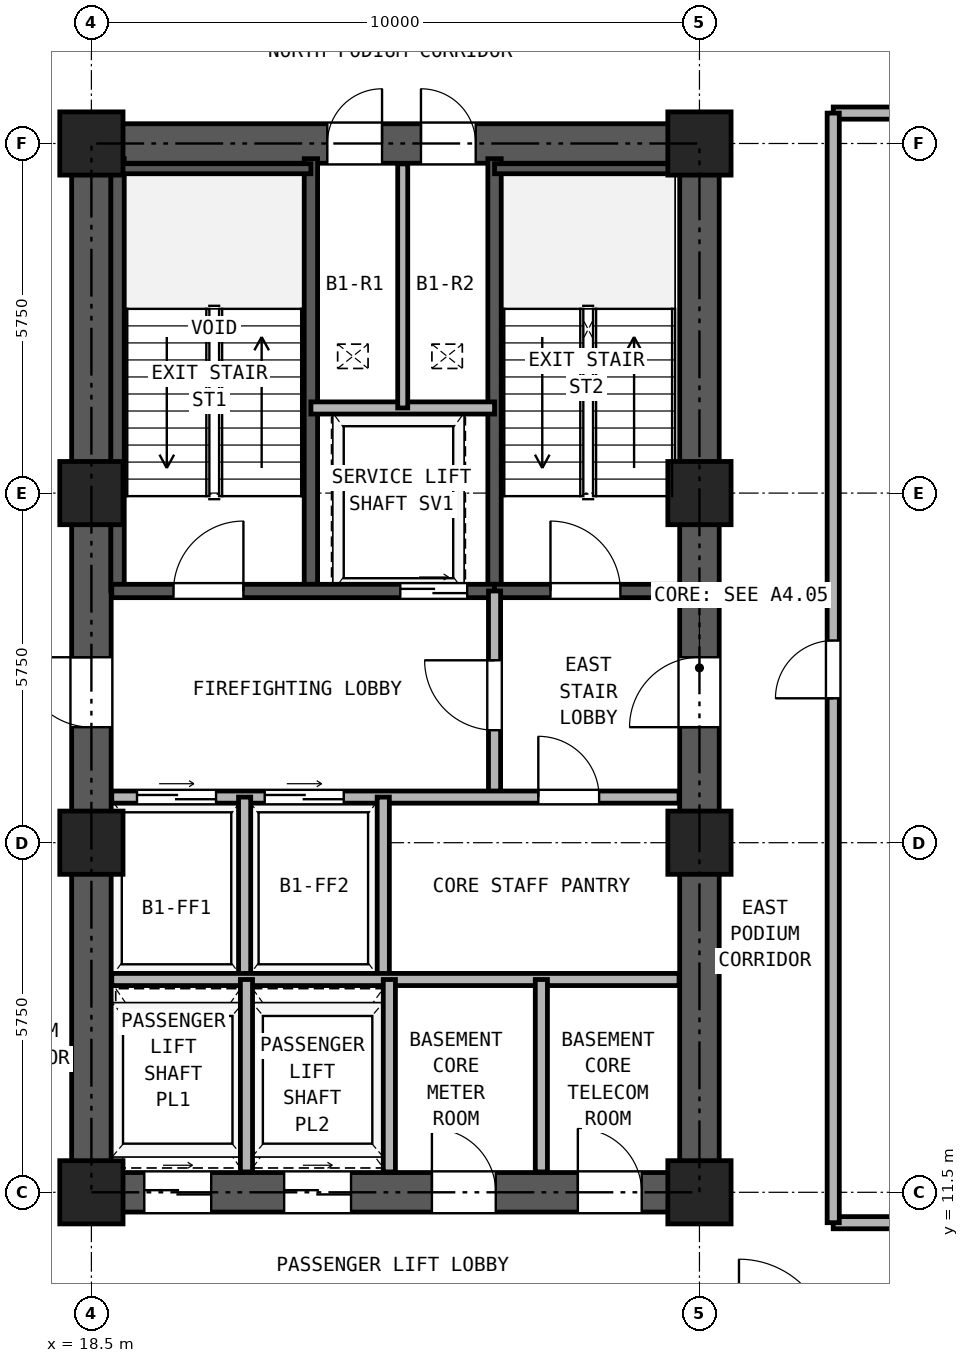
"""IFC4 building model, lengths in metres.
Left out: names, types, materials, properties, quantities, classifications, styles, units other than length and angle.
Written with IfcOpenShell. Run it as: python <this file> out.ifc"""

import sys

from ifc_helpers import new_model, si_unit, direction, frame, frame_2d, origin, origin_2d, place, context, subcontext, project, spatial, rectangle, hollow_rectangle, extrude, source, transform, mapped, element, fill, save


model = new_model("IFC4")
c1 = context("Model", 3, precision=1e-05, world=origin(), true_north=direction((0.0, 1.0)))
c2 = subcontext(c1, "Body", "Model", "MODEL_VIEW")
j1 = project(units=[si_unit("LENGTHUNIT", "METRE"), si_unit("PLANEANGLEUNIT", "RADIAN")], contexts=[c1])
p1 = place(None, origin())
s1 = spatial("IfcSite", under=j1, at=p1, CompositionType="ELEMENT")
p2 = place(p1, origin())
s2 = spatial("IfcBuilding", under=s1, at=p2, CompositionType="ELEMENT")
p3 = place(p2, frame((0.0, 0.0, -4.2)))
s3 = spatial("IfcBuildingStorey", under=s2, at=p3, CompositionType="ELEMENT", Elevation=-4.2)
m1 = source(origin(), c2, "Body", "SweptSolid", [
    extrude(hollow_rectangle(XDim=1.04, YDim=1.04, WallThickness=0.065, at=origin_2d()), origin(), (0.0, 0.0, 1.0), 3.88),
])
for number, where, z_axis, x_axis in (
    (1, (18.5, 11.5, 0.0), (0.0, 0.0, 1.0), (1.0, 0.0, 0.0)),
    (2, (18.5, 17.25, 0.0), (0.0, 0.0, 1.0), (1.0, 0.0, 0.0)),
    (3, (18.5, 23.0, 0.0), (0.0, 0.0, 1.0), (1.0, 0.0, 0.0)),
    (4, (18.5, 28.75, 0.0), (0.0, 0.0, 1.0), (1.0, 0.0, 0.0)),
    (5, (28.5, 11.5, 0.0), (0.0, 0.0, 1.0), (1.0, 0.0, 0.0)),
    (6, (28.5, 17.25, 0.0), (0.0, 0.0, 1.0), (1.0, 0.0, 0.0)),
    (7, (28.5, 23.0, 0.0), (0.0, 0.0, 1.0), (1.0, 0.0, 0.0)),
    (8, (28.5, 28.75, 0.0), (0.0, 0.0, 1.0), (1.0, 0.0, 0.0)),
):
    element("IfcColumn", number, at=place(p3, frame(where, z_axis=z_axis, x_axis=x_axis)), inside=s3, PredefinedType="COLUMN", context=c2, shape_type="MappedRepresentation", body=[
        mapped(m1, transform((0.0, 0.0, 0.0), x_axis=(1.0, 0.0, 0.0), y_axis=(0.0, 1.0, 0.0), z_axis=(0.0, 0.0, 1.0), scale=1.0)),
    ])
p4 = place(p3, frame((18.175, 11.5, 0.0), z_axis=(0.0, 0.0, 1.0), x_axis=(1.0, 0.0, 0.0)))
e9 = element("IfcWall", 9, at=p4, inside=s3, PredefinedType="SHEAR", context=c2, shape_type="SweptSolid", body=[
    extrude(rectangle(XDim=10.65, YDim=0.65, at=frame_2d((5.325, 0.0))), origin(), (0.0, 0.0, 1.0), 3.88),
])
p5 = place(p4, frame((1.195, 0.0, 0.0)))
e10 = element("IfcOpeningElement", 10, at=p5, cuts=e9, PredefinedType="OPENING", context=c2, shape_type="SweptSolid", body=[
    extrude(rectangle(XDim=1.1, YDim=2.25, at=frame_2d((0.55, 1.125))), frame((0.0, 0.335, 0.0), z_axis=(0.0, -1.0, 0.0), x_axis=(1.0, 0.0, 0.0)), (0.0, 0.0, 1.0), 0.67),
])
p6 = place(p4, frame((3.495, 0.0, 0.0)))
e11 = element("IfcOpeningElement", 11, at=p6, cuts=e9, PredefinedType="OPENING", context=c2, shape_type="SweptSolid", body=[
    extrude(rectangle(XDim=1.1, YDim=2.25, at=frame_2d((0.55, 1.125))), frame((0.0, 0.335, 0.0), z_axis=(0.0, -1.0, 0.0), x_axis=(1.0, 0.0, 0.0)), (0.0, 0.0, 1.0), 0.67),
])
p7 = place(p4, frame((5.925, 0.0, 0.0)))
e12 = element("IfcOpeningElement", 12, at=p7, cuts=e9, PredefinedType="OPENING", context=c2, shape_type="SweptSolid", body=[
    extrude(rectangle(XDim=1.05, YDim=2.15, at=frame_2d((0.525, 1.075))), frame((0.0, 0.335, 0.0), z_axis=(0.0, -1.0, 0.0), x_axis=(1.0, 0.0, 0.0)), (0.0, 0.0, 1.0), 0.67),
])
p8 = place(p4, frame((8.325, 0.0, 0.0)))
e13 = element("IfcOpeningElement", 13, at=p8, cuts=e9, PredefinedType="OPENING", context=c2, shape_type="SweptSolid", body=[
    extrude(rectangle(XDim=1.05, YDim=2.15, at=frame_2d((0.525, 1.075))), frame((0.0, 0.335, 0.0), z_axis=(0.0, -1.0, 0.0), x_axis=(1.0, 0.0, 0.0)), (0.0, 0.0, 1.0), 0.67),
])
p9 = place(p3, frame((18.175, 28.75, 0.0), z_axis=(0.0, 0.0, 1.0), x_axis=(1.0, 0.0, 0.0)))
e14 = element("IfcWall", 14, at=p9, inside=s3, PredefinedType="SHEAR", context=c2, shape_type="SweptSolid", body=[
    extrude(rectangle(XDim=10.65, YDim=0.65, at=frame_2d((5.325, 0.0))), origin(), (0.0, 0.0, 1.0), 3.88),
])
p10 = place(p9, frame((4.205, 0.0, 0.0)))
e15 = element("IfcOpeningElement", 15, at=p10, cuts=e14, PredefinedType="OPENING", context=c2, shape_type="SweptSolid", body=[
    extrude(rectangle(XDim=0.9, YDim=2.05, at=frame_2d((0.45, 1.025))), frame((0.0, 0.335, 0.0), z_axis=(0.0, -1.0, 0.0), x_axis=(1.0, 0.0, 0.0)), (0.0, 0.0, 1.0), 0.67),
])
p11 = place(p9, frame((5.745, 0.0, 0.0)))
e16 = element("IfcOpeningElement", 16, at=p11, cuts=e14, PredefinedType="OPENING", context=c2, shape_type="SweptSolid", body=[
    extrude(rectangle(XDim=0.9, YDim=2.05, at=frame_2d((0.45, 1.025))), frame((0.0, 0.335, 0.0), z_axis=(0.0, -1.0, 0.0), x_axis=(1.0, 0.0, 0.0)), (0.0, 0.0, 1.0), 0.67),
])
p12 = place(p3, frame((18.5, 11.825, 0.0), z_axis=(0.0, 0.0, 1.0), x_axis=(0.0, 1.0, 0.0)))
e17 = element("IfcWall", 17, at=p12, inside=s3, PredefinedType="SHEAR", context=c2, shape_type="SweptSolid", body=[
    extrude(rectangle(XDim=16.6, YDim=0.65, at=frame_2d((8.3, 0.0))), origin(), (0.0, 0.0, 1.0), 3.88),
])
p13 = place(p12, frame((7.325, 0.0, 0.0)))
e18 = element("IfcOpeningElement", 18, at=p13, cuts=e17, PredefinedType="OPENING", context=c2, shape_type="SweptSolid", body=[
    extrude(rectangle(XDim=1.15, YDim=2.2, at=frame_2d((0.575, 1.1))), frame((0.0, 0.335, 0.0), z_axis=(0.0, -1.0, 0.0), x_axis=(1.0, 0.0, 0.0)), (0.0, 0.0, 1.0), 0.67),
])
p14 = place(p3, frame((28.5, 11.825, 0.0), z_axis=(0.0, 0.0, 1.0), x_axis=(0.0, 1.0, 0.0)))
e19 = element("IfcWall", 19, at=p14, inside=s3, PredefinedType="SHEAR", context=c2, shape_type="SweptSolid", body=[
    extrude(rectangle(XDim=16.6, YDim=0.65, at=frame_2d((8.3, 0.0))), origin(), (0.0, 0.0, 1.0), 3.88),
])
p15 = place(p14, frame((7.325, 0.0, 0.0)))
e20 = element("IfcOpeningElement", 20, at=p15, cuts=e19, PredefinedType="OPENING", context=c2, shape_type="SweptSolid", body=[
    extrude(rectangle(XDim=1.15, YDim=2.2, at=frame_2d((0.575, 1.1))), frame((0.0, 0.335, 0.0), z_axis=(0.0, -1.0, 0.0), x_axis=(1.0, 0.0, 0.0)), (0.0, 0.0, 1.0), 0.67),
])
for number, where, z_axis, x_axis in (
    (21, (18.93, 21.39, 0.0), (0.0, 0.0, 1.0), (0.0, 1.0, 0.0)),
    (22, (22.11, 21.39, 0.0), (0.0, 0.0, 1.0), (0.0, 1.0, 0.0)),
    (23, (25.13, 21.39, 0.0), (0.0, 0.0, 1.0), (0.0, 1.0, 0.0)),
):
    element("IfcWall", number, at=place(p3, frame(where, z_axis=z_axis, x_axis=x_axis)), inside=s3, PredefinedType="SOLIDWALL", context=c2, shape_type="SweptSolid", body=[
        extrude(rectangle(XDim=7.11, YDim=0.22, at=frame_2d((3.555, 0.0))), origin(), (0.0, 0.0, 1.0), 3.88),
    ])
p16 = place(p3, frame((18.835, 28.335, 0.0), z_axis=(0.0, 0.0, 1.0), x_axis=(1.0, 0.0, 0.0)))
e24 = element("IfcWall", 24, at=p16, inside=s3, PredefinedType="PARTITIONING", context=c2, shape_type="SweptSolid", body=[
    extrude(rectangle(XDim=3.275, YDim=0.165, at=frame_2d((1.638, 0.0))), origin(), (0.0, 0.0, 1.0), 3.88),
])
p17 = place(p3, frame((25.13, 28.335, 0.0), z_axis=(0.0, 0.0, 1.0), x_axis=(1.0, 0.0, 0.0)))
e25 = element("IfcWall", 25, at=p17, inside=s3, PredefinedType="PARTITIONING", context=c2, shape_type="SweptSolid", body=[
    extrude(rectangle(XDim=3.035, YDim=0.165, at=frame_2d((1.518, 0.0))), origin(), (0.0, 0.0, 1.0), 3.88),
])
p18 = place(p3, frame((18.835, 21.39, 0.0), z_axis=(0.0, 0.0, 1.0), x_axis=(1.0, 0.0, 0.0)))
e26 = element("IfcWall", 26, at=p18, inside=s3, PredefinedType="SOLIDWALL", context=c2, shape_type="SweptSolid", body=[
    extrude(rectangle(XDim=6.295, YDim=0.22, at=frame_2d((3.147, 0.0))), origin(), (0.0, 0.0, 1.0), 3.88),
])
p19 = place(p18, frame((1.015, 0.0, 0.0)))
e27 = element("IfcOpeningElement", 27, at=p19, cuts=e26, PredefinedType="OPENING", context=c2, shape_type="SweptSolid", body=[
    extrude(rectangle(XDim=1.15, YDim=2.2, at=frame_2d((0.575, 1.1))), frame((0.0, 0.12, 0.0), z_axis=(0.0, -1.0, 0.0), x_axis=(1.0, 0.0, 0.0)), (0.0, 0.0, 1.0), 0.24),
])
p20 = place(p18, frame((4.745, 0.0, 0.0)))
e28 = element("IfcOpeningElement", 28, at=p20, cuts=e26, PredefinedType="OPENING", context=c2, shape_type="SweptSolid", body=[
    extrude(rectangle(XDim=1.1, YDim=2.25, at=frame_2d((0.55, 1.125))), frame((0.0, 0.12, 0.0), z_axis=(0.0, -1.0, 0.0), x_axis=(1.0, 0.0, 0.0)), (0.0, 0.0, 1.0), 0.24),
])
p21 = place(p3, frame((25.13, 21.39, 0.0), z_axis=(0.0, 0.0, 1.0), x_axis=(1.0, 0.0, 0.0)))
e29 = element("IfcWall", 29, at=p21, inside=s3, PredefinedType="SOLIDWALL", context=c2, shape_type="SweptSolid", body=[
    extrude(rectangle(XDim=3.035, YDim=0.22, at=frame_2d((1.518, 0.0))), origin(), (0.0, 0.0, 1.0), 3.88),
])
p22 = place(p21, frame((0.92, 0.0, 0.0)))
e30 = element("IfcOpeningElement", 30, at=p22, cuts=e29, PredefinedType="OPENING", context=c2, shape_type="SweptSolid", body=[
    extrude(rectangle(XDim=1.15, YDim=2.2, at=frame_2d((0.575, 1.1))), frame((0.0, 0.12, 0.0), z_axis=(0.0, -1.0, 0.0), x_axis=(1.0, 0.0, 0.0)), (0.0, 0.0, 1.0), 0.24),
])
p23 = place(p3, frame((22.11, 24.4, 0.0), z_axis=(0.0, 0.0, 1.0), x_axis=(1.0, 0.0, 0.0)))
e31 = element("IfcWall", 31, at=p23, inside=s3, PredefinedType="PARTITIONING", context=c2, shape_type="SweptSolid", body=[
    extrude(rectangle(XDim=3.02, YDim=0.2, at=frame_2d((1.51, 0.0))), origin(), (0.0, 0.0, 1.0), 3.88),
])
p24 = place(p3, frame((23.62, 24.4, 0.0), z_axis=(0.0, 0.0, 1.0), x_axis=(0.0, 1.0, 0.0)))
e32 = element("IfcWall", 32, at=p24, inside=s3, PredefinedType="PARTITIONING", context=c2, shape_type="SweptSolid", body=[
    extrude(rectangle(XDim=4.015, YDim=0.165, at=frame_2d((2.008, 0.0))), origin(), (0.0, 0.0, 1.0), 3.88),
])
p25 = place(p3, frame((25.13, 18.0, 0.0), z_axis=(0.0, 0.0, 1.0), x_axis=(0.0, 1.0, 0.0)))
e33 = element("IfcWall", 33, at=p25, inside=s3, PredefinedType="PARTITIONING", context=c2, shape_type="SweptSolid", body=[
    extrude(rectangle(XDim=3.39, YDim=0.2, at=frame_2d((1.695, 0.0))), origin(), (0.0, 0.0, 1.0), 3.88),
])
p26 = place(p25, frame((1.1, 0.0, 0.0)))
e34 = element("IfcOpeningElement", 34, at=p26, cuts=e33, PredefinedType="OPENING", context=c2, shape_type="SweptSolid", body=[
    extrude(rectangle(XDim=1.15, YDim=2.2, at=frame_2d((0.575, 1.1))), frame((0.0, 0.11, 0.0), z_axis=(0.0, -1.0, 0.0), x_axis=(1.0, 0.0, 0.0)), (0.0, 0.0, 1.0), 0.22),
])
p27 = place(p3, frame((18.835, 18.0, 0.0), z_axis=(0.0, 0.0, 1.0), x_axis=(1.0, 0.0, 0.0)))
e35 = element("IfcWall", 35, at=p27, inside=s3, PredefinedType="PARTITIONING", context=c2, shape_type="SweptSolid", body=[
    extrude(rectangle(XDim=9.33, YDim=0.2, at=frame_2d((4.665, 0.0))), origin(), (0.0, 0.0, 1.0), 3.88),
])
p28 = place(p27, frame((0.415, 0.0, 0.0)))
e36 = element("IfcOpeningElement", 36, at=p28, cuts=e35, PredefinedType="OPENING", context=c2, shape_type="SweptSolid", body=[
    extrude(rectangle(XDim=1.3, YDim=2.3, at=frame_2d((0.65, 1.15))), frame((0.0, 0.11, 0.0), z_axis=(0.0, -1.0, 0.0), x_axis=(1.0, 0.0, 0.0)), (0.0, 0.0, 1.0), 0.22),
])
p29 = place(p27, frame((2.515, 0.0, 0.0)))
e37 = element("IfcOpeningElement", 37, at=p29, cuts=e35, PredefinedType="OPENING", context=c2, shape_type="SweptSolid", body=[
    extrude(rectangle(XDim=1.3, YDim=2.3, at=frame_2d((0.65, 1.15))), frame((0.0, 0.11, 0.0), z_axis=(0.0, -1.0, 0.0), x_axis=(1.0, 0.0, 0.0)), (0.0, 0.0, 1.0), 0.22),
])
p30 = place(p27, frame((7.015, 0.0, 0.0)))
e38 = element("IfcOpeningElement", 38, at=p30, cuts=e35, PredefinedType="OPENING", context=c2, shape_type="SweptSolid", body=[
    extrude(rectangle(XDim=1.0, YDim=2.15, at=frame_2d((0.5, 1.075))), frame((0.0, 0.11, 0.0), z_axis=(0.0, -1.0, 0.0), x_axis=(1.0, 0.0, 0.0)), (0.0, 0.0, 1.0), 0.22),
])
for number, where, z_axis, x_axis in (
    (39, (21.02, 15.0, 0.0), (0.0, 0.0, 1.0), (0.0, 1.0, 0.0)),
    (40, (23.3, 15.0, 0.0), (0.0, 0.0, 1.0), (0.0, 1.0, 0.0)),
):
    element("IfcWall", number, at=place(p3, frame(where, z_axis=z_axis, x_axis=x_axis)), inside=s3, PredefinedType="PARTITIONING", context=c2, shape_type="SweptSolid", body=[
        extrude(rectangle(XDim=3.0, YDim=0.2, at=frame_2d((1.5, 0.0))), origin(), (0.0, 0.0, 1.0), 3.88),
    ])
p31 = place(p3, frame((18.835, 15.0, 0.0), z_axis=(0.0, 0.0, 1.0), x_axis=(1.0, 0.0, 0.0)))
e41 = element("IfcWall", 41, at=p31, inside=s3, PredefinedType="PARTITIONING", context=c2, shape_type="SweptSolid", body=[
    extrude(rectangle(XDim=9.33, YDim=0.2, at=frame_2d((4.665, 0.0))), origin(), (0.0, 0.0, 1.0), 3.88),
])
for number, where, z_axis, x_axis in (
    (42, (21.05, 11.835, 0.0), (0.0, 0.0, 1.0), (0.0, 1.0, 0.0)),
    (43, (23.4, 11.835, 0.0), (0.0, 0.0, 1.0), (0.0, 1.0, 0.0)),
    (44, (25.9, 11.835, 0.0), (0.0, 0.0, 1.0), (0.0, 1.0, 0.0)),
):
    element("IfcWall", number, at=place(p3, frame(where, z_axis=z_axis, x_axis=x_axis)), inside=s3, PredefinedType="PARTITIONING", context=c2, shape_type="SweptSolid", body=[
        extrude(rectangle(XDim=3.165, YDim=0.2, at=frame_2d((1.583, 0.0))), origin(), (0.0, 0.0, 1.0), 3.88),
    ])
for number, where, z_axis, x_axis in (
    (45, (30.7, 11.0, 0.0), (0.0, 0.0, 1.0), (1.0, 0.0, 0.0)),
    (46, (30.7, 29.25, 0.0), (0.0, 0.0, 1.0), (1.0, 0.0, 0.0)),
):
    element("IfcWall", number, at=place(p3, frame(where, z_axis=z_axis, x_axis=x_axis)), inside=s3, PredefinedType="PARTITIONING", context=c2, shape_type="SweptSolid", body=[
        extrude(rectangle(XDim=8.8, YDim=0.2, at=frame_2d((4.4, 0.0))), origin(), (0.0, 0.0, 1.0), 3.88),
    ])
p32 = place(p3, frame((30.7, 11.0, 0.0), z_axis=(0.0, 0.0, 1.0), x_axis=(0.0, 1.0, 0.0)))
e47 = element("IfcWall", 47, at=p32, inside=s3, PredefinedType="PARTITIONING", context=c2, shape_type="SweptSolid", body=[
    extrude(rectangle(XDim=18.25, YDim=0.2, at=frame_2d((9.125, 0.0))), origin(), (0.0, 0.0, 1.0), 3.88),
])
p33 = place(p32, frame((8.625, 0.0, 0.0)))
e48 = element("IfcOpeningElement", 48, at=p33, cuts=e47, PredefinedType="OPENING", context=c2, shape_type="SweptSolid", body=[
    extrude(rectangle(XDim=0.95, YDim=2.15, at=frame_2d((0.475, 1.075))), frame((0.0, 0.11, 0.0), z_axis=(0.0, -1.0, 0.0), x_axis=(1.0, 0.0, 0.0)), (0.0, 0.0, 1.0), 0.22),
])
p34 = place(p19, frame((1.15, 0.0, 0.0), z_axis=(0.0, 0.0, 1.0), x_axis=(-1.0, 0.0, 0.0)))
e49 = element("IfcDoor", 49, at=p34, inside=s3, OperationType="SINGLE_SWING_RIGHT", PredefinedType="DOOR", context=c2, shape_type="SweptSolid", body=[
    extrude(rectangle(XDim=1.15, YDim=2.2, at=frame_2d((0.575, 1.1))), frame((0.0, 0.025, 0.0), z_axis=(0.0, -1.0, 0.0), x_axis=(1.0, 0.0, 0.0)), (0.0, 0.0, 1.0), 0.05),
])
fill(e27, e49)
p35 = place(p22, frame((1.15, 0.0, 0.0), z_axis=(0.0, 0.0, 1.0), x_axis=(-1.0, 0.0, 0.0)))
e50 = element("IfcDoor", 50, at=p35, inside=s3, OperationType="SINGLE_SWING_LEFT", PredefinedType="DOOR", context=c2, shape_type="SweptSolid", body=[
    extrude(rectangle(XDim=1.15, YDim=2.2, at=frame_2d((0.575, 1.1))), frame((0.0, 0.025, 0.0), z_axis=(0.0, -1.0, 0.0), x_axis=(1.0, 0.0, 0.0)), (0.0, 0.0, 1.0), 0.05),
])
fill(e30, e50)
p36 = place(p20, frame((1.1, 0.0, 0.0), z_axis=(0.0, 0.0, 1.0), x_axis=(-1.0, 0.0, 0.0)))
e51 = element("IfcDoor", 51, at=p36, inside=s3, OperationType="DOUBLE_DOOR_SLIDING", PredefinedType="DOOR", context=c2, shape_type="SweptSolid", body=[
    extrude(rectangle(XDim=1.1, YDim=2.25, at=frame_2d((0.55, 1.125))), frame((0.0, 0.025, 0.0), z_axis=(0.0, -1.0, 0.0), x_axis=(1.0, 0.0, 0.0)), (0.0, 0.0, 1.0), 0.05),
])
fill(e28, e51)
p37 = place(p26, origin())
e52 = element("IfcDoor", 52, at=p37, inside=s3, OperationType="SINGLE_SWING_RIGHT", PredefinedType="DOOR", context=c2, shape_type="SweptSolid", body=[
    extrude(rectangle(XDim=1.15, YDim=2.2, at=frame_2d((0.575, 1.1))), frame((0.0, 0.025, 0.0), z_axis=(0.0, -1.0, 0.0), x_axis=(1.0, 0.0, 0.0)), (0.0, 0.0, 1.0), 0.05),
])
fill(e34, e52)
p38 = place(p28, origin())
e53 = element("IfcDoor", 53, at=p38, inside=s3, OperationType="DOUBLE_DOOR_SLIDING", PredefinedType="DOOR", context=c2, shape_type="SweptSolid", body=[
    extrude(rectangle(XDim=1.3, YDim=2.3, at=frame_2d((0.65, 1.15))), frame((0.0, 0.025, 0.0), z_axis=(0.0, -1.0, 0.0), x_axis=(1.0, 0.0, 0.0)), (0.0, 0.0, 1.0), 0.05),
])
fill(e36, e53)
p39 = place(p29, origin())
e54 = element("IfcDoor", 54, at=p39, inside=s3, OperationType="DOUBLE_DOOR_SLIDING", PredefinedType="DOOR", context=c2, shape_type="SweptSolid", body=[
    extrude(rectangle(XDim=1.3, YDim=2.3, at=frame_2d((0.65, 1.15))), frame((0.0, 0.025, 0.0), z_axis=(0.0, -1.0, 0.0), x_axis=(1.0, 0.0, 0.0)), (0.0, 0.0, 1.0), 0.05),
])
fill(e37, e54)
p40 = place(p30, frame((1.0, 0.0, 0.0), z_axis=(0.0, 0.0, 1.0), x_axis=(-1.0, 0.0, 0.0)))
e55 = element("IfcDoor", 55, at=p40, inside=s3, OperationType="SINGLE_SWING_LEFT", PredefinedType="DOOR", context=c2, shape_type="SweptSolid", body=[
    extrude(rectangle(XDim=1.0, YDim=2.15, at=frame_2d((0.5, 1.075))), frame((0.0, 0.025, 0.0), z_axis=(0.0, -1.0, 0.0), x_axis=(1.0, 0.0, 0.0)), (0.0, 0.0, 1.0), 0.05),
])
fill(e38, e55)
p41 = place(p13, frame((1.15, 0.0, 0.0), z_axis=(0.0, 0.0, 1.0), x_axis=(-1.0, 0.0, 0.0)))
e56 = element("IfcDoor", 56, at=p41, inside=s3, OperationType="SINGLE_SWING_RIGHT", PredefinedType="DOOR", context=c2, shape_type="SweptSolid", body=[
    extrude(rectangle(XDim=1.15, YDim=2.2, at=frame_2d((0.575, 1.1))), frame((0.0, 0.025, 0.0), z_axis=(0.0, -1.0, 0.0), x_axis=(1.0, 0.0, 0.0)), (0.0, 0.0, 1.0), 0.05),
])
fill(e18, e56)
p42 = place(p15, origin())
e57 = element("IfcDoor", 57, at=p42, inside=s3, OperationType="SINGLE_SWING_LEFT", PredefinedType="DOOR", context=c2, shape_type="SweptSolid", body=[
    extrude(rectangle(XDim=1.15, YDim=2.2, at=frame_2d((0.575, 1.1))), frame((0.0, 0.025, 0.0), z_axis=(0.0, -1.0, 0.0), x_axis=(1.0, 0.0, 0.0)), (0.0, 0.0, 1.0), 0.05),
])
fill(e20, e57)
p43 = place(p10, origin())
e58 = element("IfcDoor", 58, at=p43, inside=s3, OperationType="SINGLE_SWING_RIGHT", PredefinedType="DOOR", context=c2, shape_type="SweptSolid", body=[
    extrude(rectangle(XDim=0.9, YDim=2.05, at=frame_2d((0.45, 1.025))), frame((0.0, 0.025, 0.0), z_axis=(0.0, -1.0, 0.0), x_axis=(1.0, 0.0, 0.0)), (0.0, 0.0, 1.0), 0.05),
])
fill(e15, e58)
p44 = place(p11, origin())
e59 = element("IfcDoor", 59, at=p44, inside=s3, OperationType="SINGLE_SWING_LEFT", PredefinedType="DOOR", context=c2, shape_type="SweptSolid", body=[
    extrude(rectangle(XDim=0.9, YDim=2.05, at=frame_2d((0.45, 1.025))), frame((0.0, 0.025, 0.0), z_axis=(0.0, -1.0, 0.0), x_axis=(1.0, 0.0, 0.0)), (0.0, 0.0, 1.0), 0.05),
])
fill(e16, e59)
p45 = place(p5, frame((1.1, 0.0, 0.0), z_axis=(0.0, 0.0, 1.0), x_axis=(-1.0, 0.0, 0.0)))
e60 = element("IfcDoor", 60, at=p45, inside=s3, OperationType="DOUBLE_DOOR_SLIDING", PredefinedType="DOOR", context=c2, shape_type="SweptSolid", body=[
    extrude(rectangle(XDim=1.1, YDim=2.25, at=frame_2d((0.55, 1.125))), frame((0.0, 0.025, 0.0), z_axis=(0.0, -1.0, 0.0), x_axis=(1.0, 0.0, 0.0)), (0.0, 0.0, 1.0), 0.05),
])
fill(e10, e60)
p46 = place(p6, frame((1.1, 0.0, 0.0), z_axis=(0.0, 0.0, 1.0), x_axis=(-1.0, 0.0, 0.0)))
e61 = element("IfcDoor", 61, at=p46, inside=s3, OperationType="DOUBLE_DOOR_SLIDING", PredefinedType="DOOR", context=c2, shape_type="SweptSolid", body=[
    extrude(rectangle(XDim=1.1, YDim=2.25, at=frame_2d((0.55, 1.125))), frame((0.0, 0.025, 0.0), z_axis=(0.0, -1.0, 0.0), x_axis=(1.0, 0.0, 0.0)), (0.0, 0.0, 1.0), 0.05),
])
fill(e11, e61)
p47 = place(p7, frame((1.05, 0.0, 0.0), z_axis=(0.0, 0.0, 1.0), x_axis=(-1.0, 0.0, 0.0)))
e62 = element("IfcDoor", 62, at=p47, inside=s3, OperationType="SINGLE_SWING_LEFT", PredefinedType="DOOR", context=c2, shape_type="SweptSolid", body=[
    extrude(rectangle(XDim=1.05, YDim=2.15, at=frame_2d((0.525, 1.075))), frame((0.0, 0.025, 0.0), z_axis=(0.0, -1.0, 0.0), x_axis=(1.0, 0.0, 0.0)), (0.0, 0.0, 1.0), 0.05),
])
fill(e12, e62)
p48 = place(p8, frame((1.05, 0.0, 0.0), z_axis=(0.0, 0.0, 1.0), x_axis=(-1.0, 0.0, 0.0)))
e63 = element("IfcDoor", 63, at=p48, inside=s3, OperationType="SINGLE_SWING_LEFT", PredefinedType="DOOR", context=c2, shape_type="SweptSolid", body=[
    extrude(rectangle(XDim=1.05, YDim=2.15, at=frame_2d((0.525, 1.075))), frame((0.0, 0.025, 0.0), z_axis=(0.0, -1.0, 0.0), x_axis=(1.0, 0.0, 0.0)), (0.0, 0.0, 1.0), 0.05),
])
fill(e13, e63)
p49 = place(p33, origin())
e64 = element("IfcDoor", 64, at=p49, inside=s3, OperationType="SINGLE_SWING_LEFT", PredefinedType="DOOR", context=c2, shape_type="SweptSolid", body=[
    extrude(rectangle(XDim=0.95, YDim=2.15, at=frame_2d((0.475, 1.075))), frame((0.0, 0.025, 0.0), z_axis=(0.0, -1.0, 0.0), x_axis=(1.0, 0.0, 0.0)), (0.0, 0.0, 1.0), 0.05),
])
fill(e48, e64)
save(model, sys.argv[1])
